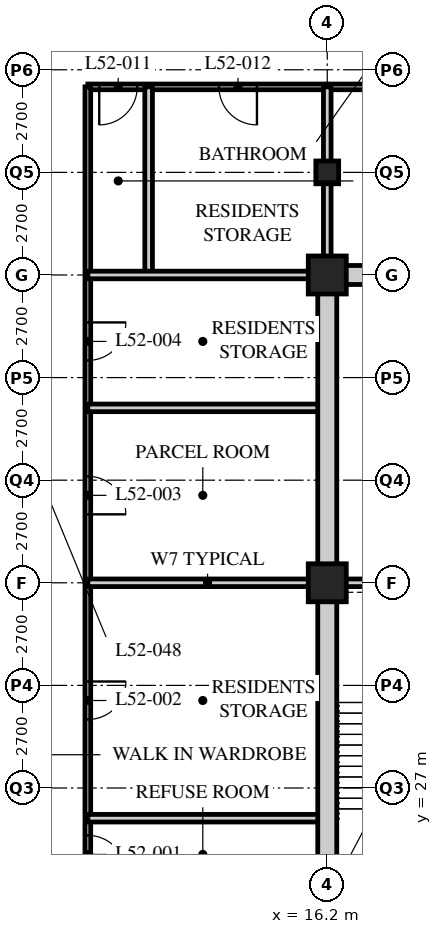
"""IFC4 building model, lengths in metres.
Left out: names, types, materials, properties, quantities, classifications, styles, units other than length and angle.
Written with IfcOpenShell. Run it as: python <this file> out.ifc"""

import sys

from ifc_helpers import new_model, si_unit, direction, frame, frame_2d, origin, origin_2d, place, context, subcontext, project, spatial, rectangle, hollow_rectangle, extrude, element, fill, save


model = new_model("IFC4")
c1 = context("Model", 3, precision=1e-05, world=origin(), true_north=direction((0.0, 1.0)))
c2 = subcontext(c1, "Body", "Model", "MODEL_VIEW")
j1 = project(units=[si_unit("LENGTHUNIT", "METRE"), si_unit("PLANEANGLEUNIT", "RADIAN")], contexts=[c1])
p1 = place(None, origin())
s1 = spatial("IfcSite", under=j1, at=p1, CompositionType="ELEMENT")
p2 = place(p1, origin())
s2 = spatial("IfcBuilding", under=s1, at=p2, CompositionType="ELEMENT")
p3 = place(p2, frame((0.0, 0.0, 202.8)))
s3 = spatial("IfcBuildingStorey", under=s2, at=p3, CompositionType="ELEMENT", Elevation=202.8)
for number, where, z_axis, x_axis in (
    (1, (16.2, 32.4, 0.0), (0.0, 0.0, 1.0), (1.0, 0.0, 0.0)),
    (2, (16.2, 40.5, 0.0), (0.0, 0.0, 1.0), (1.0, 0.0, 0.0)),
):
    element("IfcColumn", number, at=place(p3, frame(where, z_axis=z_axis, x_axis=x_axis)), inside=s3, PredefinedType="COLUMN", context=c2, shape_type="SweptSolid", body=[
        extrude(hollow_rectangle(XDim=1.0, YDim=1.0, WallThickness=0.1, at=origin_2d()), origin(), (0.0, 0.0, 1.0), 3.6),
    ])
p4 = place(p3, frame((16.2, 43.2, 0.0), z_axis=(0.0, 0.0, 1.0), x_axis=(1.0, 0.0, 0.0)))
e3 = element("IfcColumn", 3, at=p4, inside=s3, PredefinedType="COLUMN", context=c2, shape_type="SweptSolid", body=[
    extrude(hollow_rectangle(XDim=0.6, YDim=0.6, WallThickness=0.05, at=origin_2d()), origin(), (0.0, 0.0, 1.0), 3.6),
])
p5 = place(p3, frame((27.14, 45.45, 0.0), z_axis=(0.0, 0.0, 1.0), x_axis=(-1.0, 0.0, 0.0)))
e4 = element("IfcWall", 4, at=p5, inside=s3, PredefinedType="PARTITIONING", context=c2, shape_type="SweptSolid", body=[
    extrude(rectangle(XDim=17.24, YDim=0.15, at=frame_2d((8.62, 0.0))), origin(), (0.0, 0.0, 1.0), 3.39),
])
p6 = place(p5, frame((15.94, 0.0, 0.0)))
e5 = element("IfcOpeningElement", 5, at=p6, cuts=e4, PredefinedType="OPENING", context=c2, shape_type="SweptSolid", body=[
    extrude(rectangle(XDim=1.0, YDim=2.1, at=frame_2d((0.5, 1.05))), frame((0.0, 0.085, 0.0), z_axis=(0.0, -1.0, 0.0), x_axis=(1.0, 0.0, 0.0)), (0.0, 0.0, 1.0), 0.17),
])
p7 = place(p5, frame((12.79, 0.0, 0.0)))
e6 = element("IfcOpeningElement", 6, at=p7, cuts=e4, PredefinedType="OPENING", context=c2, shape_type="SweptSolid", body=[
    extrude(rectangle(XDim=1.0, YDim=2.1, at=frame_2d((0.5, 1.05))), frame((0.0, 0.085, 0.0), z_axis=(0.0, -1.0, 0.0), x_axis=(1.0, 0.0, 0.0)), (0.0, 0.0, 1.0), 0.17),
])
p8 = place(p5, frame((7.511, 0.0, 0.0)))
e7 = element("IfcOpeningElement", 7, at=p8, cuts=e4, PredefinedType="OPENING", context=c2, shape_type="SweptSolid", body=[
    extrude(rectangle(XDim=1.0, YDim=2.1, at=frame_2d((0.5, 1.05))), frame((0.0, 0.085, 0.0), z_axis=(0.0, -1.0, 0.0), x_axis=(1.0, 0.0, 0.0)), (0.0, 0.0, 1.0), 0.17),
])
p9 = place(p5, frame((2.036, 0.0, 0.0)))
e8 = element("IfcOpeningElement", 8, at=p9, cuts=e4, PredefinedType="OPENING", context=c2, shape_type="SweptSolid", body=[
    extrude(rectangle(XDim=1.0, YDim=2.1, at=frame_2d((0.5, 1.05))), frame((0.0, 0.085, 0.0), z_axis=(0.0, -1.0, 0.0), x_axis=(1.0, 0.0, 0.0)), (0.0, 0.0, 1.0), 0.17),
])
p10 = place(p3, frame((9.9, 45.45, 0.0), z_axis=(0.0, 0.0, 1.0), x_axis=(0.0, -1.0, 0.0)))
e9 = element("IfcWall", 9, at=p10, inside=s3, PredefinedType="PARTITIONING", context=c2, shape_type="SweptSolid", body=[
    extrude(rectangle(XDim=24.75, YDim=0.15, at=frame_2d((12.375, 0.0))), origin(), (0.0, 0.0, 1.0), 3.39),
])
p11 = place(p10, frame((19.698, 0.0, 0.0)))
e10 = element("IfcOpeningElement", 10, at=p11, cuts=e9, PredefinedType="OPENING", context=c2, shape_type="SweptSolid", body=[
    extrude(rectangle(XDim=1.0, YDim=2.1, at=frame_2d((0.5, 1.05))), frame((0.0, 0.085, 0.0), z_axis=(0.0, -1.0, 0.0), x_axis=(1.0, 0.0, 0.0)), (0.0, 0.0, 1.0), 0.17),
])
p12 = place(p10, frame((15.648, 0.0, 0.0)))
e11 = element("IfcOpeningElement", 11, at=p12, cuts=e9, PredefinedType="OPENING", context=c2, shape_type="SweptSolid", body=[
    extrude(rectangle(XDim=1.0, YDim=2.1, at=frame_2d((0.5, 1.05))), frame((0.0, 0.085, 0.0), z_axis=(0.0, -1.0, 0.0), x_axis=(1.0, 0.0, 0.0)), (0.0, 0.0, 1.0), 0.17),
])
p13 = place(p10, frame((10.248, 0.0, 0.0)))
e12 = element("IfcOpeningElement", 12, at=p13, cuts=e9, PredefinedType="OPENING", context=c2, shape_type="SweptSolid", body=[
    extrude(rectangle(XDim=1.0, YDim=2.1, at=frame_2d((0.5, 1.05))), frame((0.0, 0.085, 0.0), z_axis=(0.0, -1.0, 0.0), x_axis=(1.0, 0.0, 0.0)), (0.0, 0.0, 1.0), 0.17),
])
p14 = place(p10, frame((6.198, 0.0, 0.0)))
e13 = element("IfcOpeningElement", 13, at=p14, cuts=e9, PredefinedType="OPENING", context=c2, shape_type="SweptSolid", body=[
    extrude(rectangle(XDim=1.0, YDim=2.1, at=frame_2d((0.5, 1.05))), frame((0.0, 0.085, 0.0), z_axis=(0.0, -1.0, 0.0), x_axis=(1.0, 0.0, 0.0)), (0.0, 0.0, 1.0), 0.17),
])
for number, where, z_axis, x_axis in (
    (14, (9.9, 32.4, 0.0), (0.0, 0.0, 1.0), (1.0, 0.0, 0.0)),
    (15, (9.9, 26.205, 0.0), (0.0, 0.0, 1.0), (1.0, 0.0, 0.0)),
    (16, (9.9, 37.003, 0.0), (0.0, 0.0, 1.0), (1.0, 0.0, 0.0)),
):
    element("IfcWall", number, at=place(p3, frame(where, z_axis=z_axis, x_axis=x_axis)), inside=s3, PredefinedType="SOLIDWALL", context=c2, shape_type="SweptSolid", body=[
        extrude(rectangle(XDim=6.3, YDim=0.2, at=frame_2d((3.15, 0.0))), origin(), (0.0, 0.0, 1.0), 3.39),
    ])
p15 = place(p3, frame((16.2, 40.5, 0.0), z_axis=(0.0, 0.0, 1.0), x_axis=(0.0, 1.0, 0.0)))
e17 = element("IfcWall", 17, at=p15, inside=s3, PredefinedType="SOLIDWALL", context=c2, shape_type="SweptSolid", body=[
    extrude(rectangle(XDim=4.95, YDim=0.2, at=frame_2d((2.475, 0.0))), origin(), (0.0, 0.0, 1.0), 2.69),
])
p16 = place(p3, frame((11.5, 45.45, 0.0), z_axis=(0.0, 0.0, 1.0), x_axis=(0.0, -1.0, 0.0)))
e18 = element("IfcWall", 18, at=p16, inside=s3, PredefinedType="SOLIDWALL", context=c2, shape_type="SweptSolid", body=[
    extrude(rectangle(XDim=4.95, YDim=0.2, at=frame_2d((2.475, 0.0))), origin(), (0.0, 0.0, 1.0), 3.39),
])
p17 = place(p3, frame((9.9, 40.5, 0.0), z_axis=(0.0, 0.0, 1.0), x_axis=(1.0, 0.0, 0.0)))
e19 = element("IfcWall", 19, at=p17, inside=s3, PredefinedType="SOLIDWALL", context=c2, shape_type="SweptSolid", body=[
    extrude(rectangle(XDim=6.3, YDim=0.2, at=frame_2d((3.15, 0.0))), origin(), (0.0, 0.0, 1.0), 3.39),
])
p18 = place(p3, frame((15.95, 40.5, 0.0), z_axis=(0.0, 0.0, 1.0), x_axis=(1.0, 0.0, 0.0)))
e20 = element("IfcWall", 20, at=p18, inside=s3, PredefinedType="SOLIDWALL", context=c2, shape_type="SweptSolid", body=[
    extrude(rectangle(XDim=24.8, YDim=0.5, at=frame_2d((12.4, 0.0))), origin(), (0.0, 0.0, 1.0), 2.74),
])
p19 = place(p18, frame((11.5, 0.0, 0.0)))
e21 = element("IfcOpeningElement", 21, at=p19, cuts=e20, PredefinedType="OPENING", context=c2, shape_type="SweptSolid", body=[
    extrude(rectangle(XDim=1.8, YDim=2.4, at=frame_2d((0.9, 1.2))), frame((0.0, 0.26, 0.0), z_axis=(0.0, -1.0, 0.0), x_axis=(1.0, 0.0, 0.0)), (0.0, 0.0, 1.0), 0.52),
])
p20 = place(p3, frame((16.2, 24.55, 0.0), z_axis=(0.0, 0.0, 1.0), x_axis=(0.0, 1.0, 0.0)))
e22 = element("IfcWall", 22, at=p20, inside=s3, PredefinedType="SOLIDWALL", context=c2, shape_type="SweptSolid", body=[
    extrude(rectangle(XDim=15.7, YDim=0.5, at=frame_2d((7.85, 0.0))), origin(), (0.0, 0.0, 1.0), 2.778),
])
p21 = place(p3, frame((16.45, 32.4, 0.0), z_axis=(0.0, 0.0, 1.0), x_axis=(1.0, 0.0, 0.0)))
e23 = element("IfcWall", 23, at=p21, inside=s3, PredefinedType="SOLIDWALL", context=c2, shape_type="SweptSolid", body=[
    extrude(rectangle(XDim=7.95, YDim=0.2, at=frame_2d((3.975, 0.0))), origin(), (0.0, 0.0, 1.0), 2.778),
])
p22 = place(p11, origin())
e24 = element("IfcDoor", 24, at=p22, inside=s3, OperationType="SINGLE_SWING_RIGHT", PredefinedType="DOOR", context=c2, shape_type="SweptSolid", body=[
    extrude(rectangle(XDim=1.0, YDim=2.1, at=frame_2d((0.5, 1.05))), frame((0.0, 0.025, 0.0), z_axis=(0.0, -1.0, 0.0), x_axis=(1.0, 0.0, 0.0)), (0.0, 0.0, 1.0), 0.05),
])
fill(e10, e24)
p23 = place(p12, origin())
e25 = element("IfcDoor", 25, at=p23, inside=s3, OperationType="SINGLE_SWING_LEFT", PredefinedType="DOOR", context=c2, shape_type="SweptSolid", body=[
    extrude(rectangle(XDim=1.0, YDim=2.1, at=frame_2d((0.5, 1.05))), frame((0.0, 0.025, 0.0), z_axis=(0.0, -1.0, 0.0), x_axis=(1.0, 0.0, 0.0)), (0.0, 0.0, 1.0), 0.05),
])
fill(e11, e25)
p24 = place(p13, origin())
e26 = element("IfcDoor", 26, at=p24, inside=s3, OperationType="SINGLE_SWING_RIGHT", PredefinedType="DOOR", context=c2, shape_type="SweptSolid", body=[
    extrude(rectangle(XDim=1.0, YDim=2.1, at=frame_2d((0.5, 1.05))), frame((0.0, 0.025, 0.0), z_axis=(0.0, -1.0, 0.0), x_axis=(1.0, 0.0, 0.0)), (0.0, 0.0, 1.0), 0.05),
])
fill(e12, e26)
p25 = place(p14, origin())
e27 = element("IfcDoor", 27, at=p25, inside=s3, OperationType="SINGLE_SWING_LEFT", PredefinedType="DOOR", context=c2, shape_type="SweptSolid", body=[
    extrude(rectangle(XDim=1.0, YDim=2.1, at=frame_2d((0.5, 1.05))), frame((0.0, 0.025, 0.0), z_axis=(0.0, -1.0, 0.0), x_axis=(1.0, 0.0, 0.0)), (0.0, 0.0, 1.0), 0.05),
])
fill(e13, e27)
p26 = place(p6, origin())
e28 = element("IfcDoor", 28, at=p26, inside=s3, OperationType="SINGLE_SWING_RIGHT", PredefinedType="DOOR", context=c2, shape_type="SweptSolid", body=[
    extrude(rectangle(XDim=1.0, YDim=2.1, at=frame_2d((0.5, 1.05))), frame((0.0, 0.025, 0.0), z_axis=(0.0, -1.0, 0.0), x_axis=(1.0, 0.0, 0.0)), (0.0, 0.0, 1.0), 0.05),
])
fill(e5, e28)
p27 = place(p7, origin())
e29 = element("IfcDoor", 29, at=p27, inside=s3, OperationType="SINGLE_SWING_LEFT", PredefinedType="DOOR", context=c2, shape_type="SweptSolid", body=[
    extrude(rectangle(XDim=1.0, YDim=2.1, at=frame_2d((0.5, 1.05))), frame((0.0, 0.025, 0.0), z_axis=(0.0, -1.0, 0.0), x_axis=(1.0, 0.0, 0.0)), (0.0, 0.0, 1.0), 0.05),
])
fill(e6, e29)
save(model, sys.argv[1])
